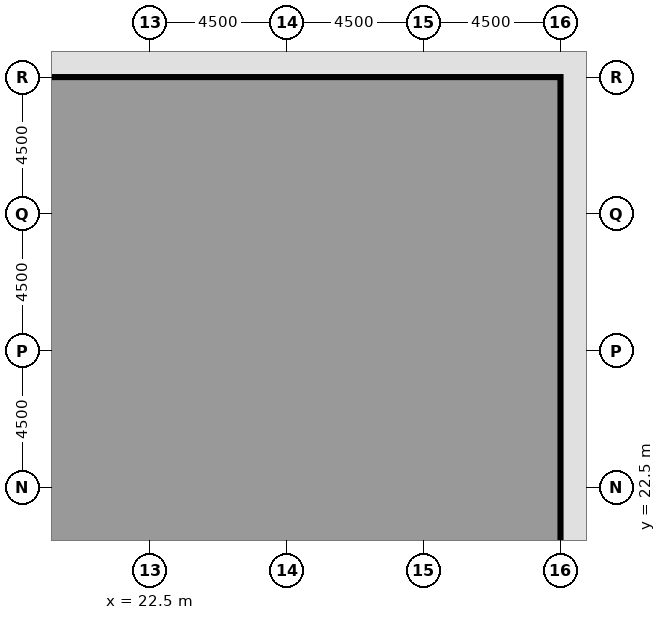
"""IFC4 building model, lengths in metres.
Left out: names, types, materials, properties, quantities, classifications, styles, units other than length and angle.
Written with IfcOpenShell. Run it as: python <this file> out.ifc"""

import sys

from ifc_helpers import new_model, si_unit, direction, frame, frame_2d, origin, origin_2d, place, context, subcontext, project, spatial, rectangle, extrude, element, fill, save


model = new_model("IFC4")
c1 = context("Model", 3, precision=1e-05, world=origin(), true_north=direction((0.0, 1.0)))
c2 = subcontext(c1, "Body", "Model", "MODEL_VIEW")
j1 = project(units=[si_unit("LENGTHUNIT", "METRE"), si_unit("PLANEANGLEUNIT", "RADIAN")], contexts=[c1])
p1 = place(None, origin())
s1 = spatial("IfcSite", under=j1, at=p1, CompositionType="ELEMENT")
p2 = place(p1, origin())
s2 = spatial("IfcBuilding", under=s1, at=p2, CompositionType="ELEMENT")
p3 = place(p2, origin())
s3 = spatial("IfcBuildingStorey", under=s2, at=p3, CompositionType="ELEMENT", Elevation=0.0)
for number, where, z_axis, x_axis in (
    (1, (22.5, 36.0, 0.0), (0.0, 0.0, 1.0), (1.0, 0.0, 0.0)),
    (2, (27.0, 36.0, 0.0), (0.0, 0.0, 1.0), (1.0, 0.0, 0.0)),
    (3, (31.5, 36.0, 0.0), (0.0, 0.0, 1.0), (1.0, 0.0, 0.0)),
    (4, (36.0, 22.5, 0.0), (0.0, 0.0, 1.0), (1.0, 0.0, 0.0)),
    (5, (36.0, 27.0, 0.0), (0.0, 0.0, 1.0), (1.0, 0.0, 0.0)),
    (6, (36.0, 31.5, 0.0), (0.0, 0.0, 1.0), (1.0, 0.0, 0.0)),
):
    element("IfcColumn", number, at=place(p3, frame(where, z_axis=z_axis, x_axis=x_axis)), inside=s3, PredefinedType="COLUMN", context=c2, shape_type="SweptSolid", body=[
        extrude(rectangle(XDim=1.4, YDim=1.4, at=origin_2d()), origin(), (0.0, 0.0, 1.0), 7.2),
    ])
p4 = place(p3, frame((22.5, 22.5, 0.0), z_axis=(0.0, 0.0, 1.0), x_axis=(1.0, 0.0, 0.0)))
e7 = element("IfcColumn", 7, at=p4, inside=s3, PredefinedType="COLUMN", context=c2, shape_type="SweptSolid", body=[
    extrude(rectangle(XDim=1.6, YDim=1.6, at=origin_2d()), origin(), (0.0, 0.0, 1.0), 7.2),
])
for number, where, z_axis, x_axis in (
    (8, (22.5, 27.0, 0.0), (0.0, 0.0, 1.0), (1.0, 0.0, 0.0)),
    (9, (27.0, 22.5, 0.0), (0.0, 0.0, 1.0), (1.0, 0.0, 0.0)),
):
    element("IfcColumn", number, at=place(p3, frame(where, z_axis=z_axis, x_axis=x_axis)), inside=s3, PredefinedType="COLUMN", context=c2, shape_type="SweptSolid", body=[
        extrude(rectangle(XDim=1.6, YDim=1.6, at=origin_2d()), origin(), (0.0, 0.0, 1.0), 6.75),
    ])
p5 = place(p3, frame((27.0, 27.0, 0.0), z_axis=(0.0, 0.0, 1.0), x_axis=(1.0, 0.0, 0.0)))
e10 = element("IfcColumn", 10, at=p5, inside=s3, PredefinedType="COLUMN", context=c2, shape_type="SweptSolid", body=[
    extrude(rectangle(XDim=1.6, YDim=1.6, at=origin_2d()), origin(), (0.0, 0.0, 1.0), 4.95),
])
for number, where, z_axis, x_axis in (
    (11, (36.0, 21.8, 0.0), (0.0, 0.0, 1.0), (0.0, -1.0, 0.0)),
    (12, (36.0, 26.3, 0.0), (0.0, 0.0, 1.0), (0.0, -1.0, 0.0)),
    (13, (36.0, 30.8, 0.0), (0.0, 0.0, 1.0), (0.0, -1.0, 0.0)),
):
    element("IfcWall", number, at=place(p3, frame(where, z_axis=z_axis, x_axis=x_axis)), inside=s3, PredefinedType="SOLIDWALL", context=c2, shape_type="SweptSolid", body=[
        extrude(rectangle(XDim=3.1, YDim=0.35, at=frame_2d((1.55, 0.0))), origin(), (0.0, 0.0, 1.0), 5.85),
    ])
p6 = place(p3, frame((32.076, 35.424, 0.0), z_axis=(0.0, 0.0, 1.0), x_axis=(0.707106781187, -0.707106781187, 0.0)))
e14 = element("IfcWall", 14, at=p6, inside=s3, PredefinedType="SOLIDWALL", context=c2, shape_type="SweptSolid", body=[
    extrude(rectangle(XDim=4.734, YDim=0.35, at=frame_2d((2.367, 0.0))), origin(), (0.0, 0.0, 1.0), 5.85),
])
for number, where, z_axis, x_axis in (
    (15, (27.7, 36.0, 0.0), (0.0, 0.0, 1.0), (1.0, 0.0, 0.0)),
    (16, (23.2, 36.0, 0.0), (0.0, 0.0, 1.0), (1.0, 0.0, 0.0)),
    (17, (18.7, 36.0, 0.0), (0.0, 0.0, 1.0), (1.0, 0.0, 0.0)),
):
    element("IfcWall", number, at=place(p3, frame(where, z_axis=z_axis, x_axis=x_axis)), inside=s3, PredefinedType="SOLIDWALL", context=c2, shape_type="SweptSolid", body=[
        extrude(rectangle(XDim=3.1, YDim=0.35, at=frame_2d((1.55, 0.0))), origin(), (0.0, 0.0, 1.0), 5.85),
    ])
p7 = place(p3, frame((18.85, 21.7, 0.0), z_axis=(0.0, 0.0, 1.0), x_axis=(1.0, 0.0, 0.0)))
e18 = element("IfcWall", 18, at=p7, inside=s3, PredefinedType="PARTITIONING", context=c2, shape_type="SweptSolid", body=[
    extrude(rectangle(XDim=1.35, YDim=0.15, at=frame_2d((0.675, 0.0))), origin(), (0.0, 0.0, 1.0), 6.75),
])
p8 = place(p3, frame((27.85, 21.7, 0.0), z_axis=(0.0, 0.0, 1.0), x_axis=(1.0, 0.0, 0.0)))
e19 = element("IfcWall", 19, at=p8, inside=s3, PredefinedType="PARTITIONING", context=c2, shape_type="SweptSolid", body=[
    extrude(rectangle(XDim=7.975, YDim=0.15, at=frame_2d((3.987, 0.0))), origin(), (0.0, 0.0, 1.0), 6.75),
])
p9 = place(p8, frame((3.488, 0.0, 0.0)))
e20 = element("IfcOpeningElement", 20, at=p9, cuts=e19, PredefinedType="OPENING", context=c2, shape_type="SweptSolid", body=[
    extrude(rectangle(XDim=1.0, YDim=2.1, at=frame_2d((0.5, 1.05))), frame((0.0, 0.085, 0.0), z_axis=(0.0, -1.0, 0.0), x_axis=(1.0, 0.0, 0.0)), (0.0, 0.0, 1.0), 0.17),
])
p10 = place(p3, frame((23.35, 21.7, 0.0), z_axis=(0.0, 0.0, 1.0), x_axis=(1.0, 0.0, 0.0)))
e21 = element("IfcWall", 21, at=p10, inside=s3, PredefinedType="PARTITIONING", context=c2, shape_type="SweptSolid", body=[
    extrude(rectangle(XDim=2.8, YDim=0.15, at=frame_2d((1.4, 0.0))), origin(), (0.0, 0.0, 1.0), 6.75),
])
p11 = place(p3, frame((20.2, 21.7, 0.0), z_axis=(0.0, 0.0, 1.0), x_axis=(1.0, 0.0, 0.0)))
e22 = element("IfcWall", 22, at=p11, inside=s3, PredefinedType="PARTITIONING", context=c2, shape_type="SweptSolid", body=[
    extrude(rectangle(XDim=1.45, YDim=0.15, at=frame_2d((0.725, 0.0))), origin(), (0.0, 0.0, 1.0), 6.75),
])
p12 = place(p3, frame((20.2, 21.7, 0.0), z_axis=(0.0, 0.0, 1.0), x_axis=(0.0, 1.0, 0.0)))
e23 = element("IfcWall", 23, at=p12, inside=s3, PredefinedType="PARTITIONING", context=c2, shape_type="SweptSolid", body=[
    extrude(rectangle(XDim=14.125, YDim=0.15, at=frame_2d((7.062, 0.0))), origin(), (0.0, 0.0, 1.0), 6.75),
])
p13 = place(p9, origin())
e24 = element("IfcDoor", 24, at=p13, inside=s3, OperationType="SINGLE_SWING_RIGHT", PredefinedType="DOOR", context=c2, shape_type="SweptSolid", body=[
    extrude(rectangle(XDim=1.0, YDim=2.1, at=frame_2d((0.5, 1.05))), frame((0.0, 0.025, 0.0), z_axis=(0.0, -1.0, 0.0), x_axis=(1.0, 0.0, 0.0)), (0.0, 0.0, 1.0), 0.05),
])
fill(e20, e24)
save(model, sys.argv[1])
